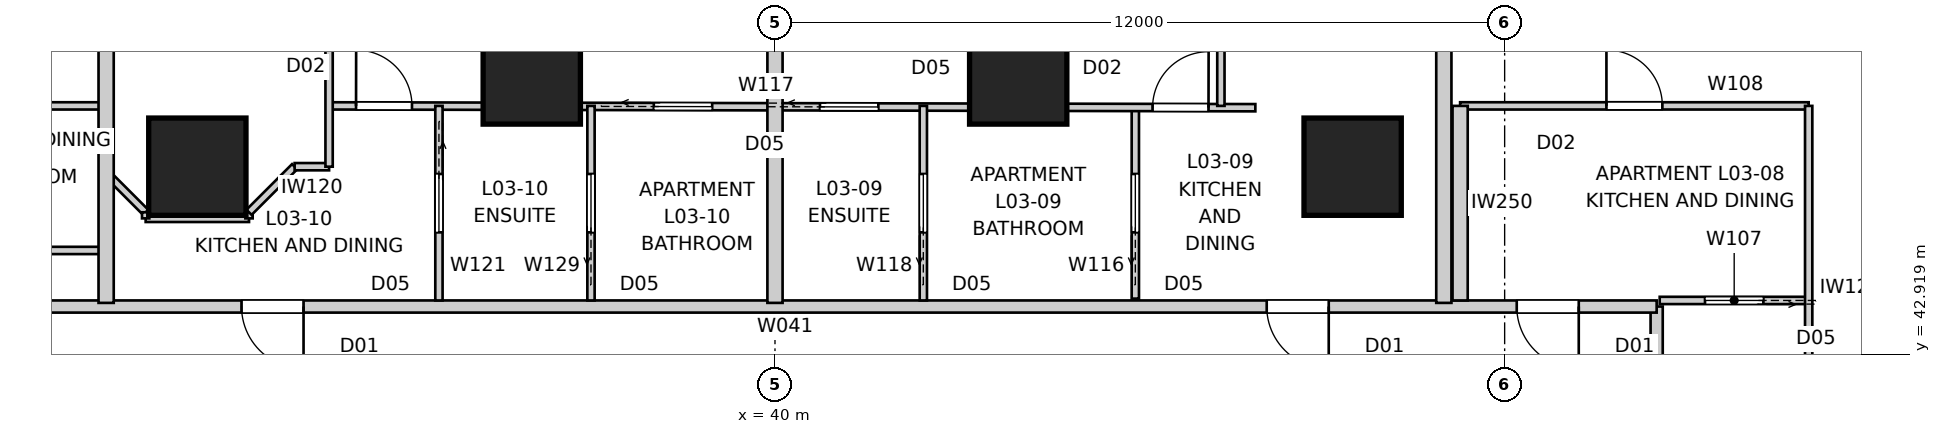
"""IFC4 building model, lengths in metres.
Left out: names, types, materials, properties, quantities, classifications, styles, units other than length and angle.
Written with IfcOpenShell. Run it as: python <this file> out.ifc"""

import sys

from ifc_helpers import new_model, si_unit, direction, frame, frame_2d, origin, origin_2d, place, context, subcontext, project, spatial, rectangle, extrude, element, fill, save


model = new_model("IFC4")
c1 = context("Model", 3, precision=1e-05, world=origin(), true_north=direction((0.0, 1.0)))
c2 = subcontext(c1, "Body", "Model", "MODEL_VIEW")
j1 = project(units=[si_unit("LENGTHUNIT", "METRE"), si_unit("PLANEANGLEUNIT", "RADIAN")], contexts=[c1])
p1 = place(None, origin())
s1 = spatial("IfcSite", under=j1, at=p1, CompositionType="ELEMENT")
p2 = place(p1, origin())
s2 = spatial("IfcBuilding", under=s1, at=p2, CompositionType="ELEMENT")
p3 = place(p2, frame((0.0, 0.0, 15.0)))
s3 = spatial("IfcBuildingStorey", under=s2, at=p3, CompositionType="ELEMENT", Elevation=15.0)
for number, where, z_axis, x_axis in (
    (1, (49.5, 46.0, 0.0), (0.0, 0.0, 1.0), (1.0, 0.0, 0.0)),
    (2, (44.0, 47.5, 0.0), (0.0, 0.0, 1.0), (1.0, 0.0, 0.0)),
    (3, (36.0, 47.5, 0.0), (0.0, 0.0, 1.0), (1.0, 0.0, 0.0)),
    (4, (30.5, 46.0, 0.0), (0.0, 0.0, 1.0), (1.0, 0.0, 0.0)),
):
    element("IfcColumn", number, at=place(p3, frame(where, z_axis=z_axis, x_axis=x_axis)), inside=s3, PredefinedType="COLUMN", context=c2, shape_type="SweptSolid", body=[
        extrude(rectangle(XDim=1.6, YDim=1.6, at=origin_2d()), origin(), (0.0, 0.0, 1.0), 3.4),
    ])
p4 = place(p3, frame((54.5, 16.3, 0.0), z_axis=(0.0, 0.0, 1.0), x_axis=(0.0, 1.0, 0.0)))
e5 = element("IfcWall", 5, at=p4, inside=s3, PredefinedType="PARTITIONING", context=c2, shape_type="SweptSolid", body=[
    extrude(rectangle(XDim=27.4, YDim=0.2, at=frame_2d((13.7, 0.0))), origin(), (0.0, 0.0, 1.0), 3.25),
])
p5 = place(p4, frame((20.998, 0.0, 0.0)))
e6 = element("IfcOpeningElement", 6, at=p5, cuts=e5, PredefinedType="OPENING", context=c2, shape_type="SweptSolid", body=[
    extrude(rectangle(XDim=1.02, YDim=2.34, at=frame_2d((0.51, 1.17))), frame((0.0, 0.11, 0.0), z_axis=(0.0, -1.0, 0.0), x_axis=(1.0, 0.0, 0.0)), (0.0, 0.0, 1.0), 0.22),
])
p6 = place(p4, frame((11.119, 0.0, 0.0)))
e7 = element("IfcOpeningElement", 7, at=p6, cuts=e5, PredefinedType="OPENING", context=c2, shape_type="SweptSolid", body=[
    extrude(rectangle(XDim=1.02, YDim=2.34, at=frame_2d((0.51, 1.17))), frame((0.0, 0.11, 0.0), z_axis=(0.0, -1.0, 0.0), x_axis=(1.0, 0.0, 0.0)), (0.0, 0.0, 1.0), 0.22),
])
p7 = place(p4, frame((1.015, 0.0, 0.0)))
e8 = element("IfcOpeningElement", 8, at=p7, cuts=e5, PredefinedType="OPENING", context=c2, shape_type="SweptSolid", body=[
    extrude(rectangle(XDim=1.02, YDim=2.34, at=frame_2d((0.51, 1.17))), frame((0.0, 0.11, 0.0), z_axis=(0.0, -1.0, 0.0), x_axis=(1.0, 0.0, 0.0)), (0.0, 0.0, 1.0), 0.22),
])
p8 = place(p3, frame((54.5, 43.7, 0.0), z_axis=(0.0, 0.0, 1.0), x_axis=(-1.0, 0.0, 0.0)))
e9 = element("IfcWall", 9, at=p8, inside=s3, PredefinedType="PARTITIONING", context=c2, shape_type="SweptSolid", body=[
    extrude(rectangle(XDim=29.0, YDim=0.2, at=frame_2d((14.5, 0.0))), origin(), (0.0, 0.0, 1.0), 3.25),
])
p9 = place(p8, frame((22.253, 0.0, 0.0)))
e10 = element("IfcOpeningElement", 10, at=p9, cuts=e9, PredefinedType="OPENING", context=c2, shape_type="SweptSolid", body=[
    extrude(rectangle(XDim=1.02, YDim=2.34, at=frame_2d((0.51, 1.17))), frame((0.0, 0.11, 0.0), z_axis=(0.0, -1.0, 0.0), x_axis=(1.0, 0.0, 0.0)), (0.0, 0.0, 1.0), 0.22),
])
p10 = place(p8, frame((5.393, 0.0, 0.0)))
e11 = element("IfcOpeningElement", 11, at=p10, cuts=e9, PredefinedType="OPENING", context=c2, shape_type="SweptSolid", body=[
    extrude(rectangle(XDim=1.02, YDim=2.34, at=frame_2d((0.51, 1.17))), frame((0.0, 0.11, 0.0), z_axis=(0.0, -1.0, 0.0), x_axis=(1.0, 0.0, 0.0)), (0.0, 0.0, 1.0), 0.22),
])
p11 = place(p8, frame((1.281, 0.0, 0.0)))
e12 = element("IfcOpeningElement", 12, at=p11, cuts=e9, PredefinedType="OPENING", context=c2, shape_type="SweptSolid", body=[
    extrude(rectangle(XDim=1.02, YDim=2.34, at=frame_2d((0.51, 1.17))), frame((0.0, 0.11, 0.0), z_axis=(0.0, -1.0, 0.0), x_axis=(1.0, 0.0, 0.0)), (0.0, 0.0, 1.0), 0.22),
])
for number, where, z_axis, x_axis in (
    (13, (51.0, 56.0, 0.0), (0.0, 0.0, 1.0), (0.0, -1.0, 0.0)),
    (14, (29.0, 56.0, 0.0), (0.0, 0.0, 1.0), (0.0, -1.0, 0.0)),
):
    element("IfcWall", number, at=place(p3, frame(where, z_axis=z_axis, x_axis=x_axis)), inside=s3, PredefinedType="PARTITIONING", context=c2, shape_type="SweptSolid", body=[
        extrude(rectangle(XDim=12.24, YDim=0.25, at=frame_2d((6.12, 0.0))), origin(), (0.0, 0.0, 1.0), 3.25),
    ])
p12 = place(p3, frame((40.0, 56.0, 0.0), z_axis=(0.0, 0.0, 1.0), x_axis=(0.0, -1.0, 0.0)))
e15 = element("IfcWall", 15, at=p12, inside=s3, PredefinedType="PARTITIONING", context=c2, shape_type="SweptSolid", body=[
    extrude(rectangle(XDim=8.5, YDim=0.25, at=frame_2d((4.25, 0.0))), origin(), (0.0, 0.0, 1.0), 3.25),
])
p13 = place(p3, frame((40.0, 47.5, 0.0), z_axis=(0.0, 0.0, 1.0), x_axis=(0.0, -1.0, 0.0)))
e16 = element("IfcWall", 16, at=p13, inside=s3, PredefinedType="PARTITIONING", context=c2, shape_type="SweptSolid", body=[
    extrude(rectangle(XDim=3.74, YDim=0.25, at=frame_2d((1.87, 0.0))), origin(), (0.0, 0.0, 1.0), 2.796),
])
p14 = place(p3, frame((57.0, 43.8, 0.0), z_axis=(0.0, 0.0, 1.0), x_axis=(-1.0, 0.0, 0.0)))
e17 = element("IfcWall", 17, at=p14, inside=s3, PredefinedType="PARTITIONING", context=c2, shape_type="SweptSolid", body=[
    extrude(rectangle(XDim=2.45, YDim=0.12, at=frame_2d((1.225, 0.0))), origin(), (0.0, 0.0, 1.0), 3.25),
])
p15 = place(p14, frame((0.745, 0.0, 0.0)))
e18 = element("IfcOpeningElement", 18, at=p15, cuts=e17, PredefinedType="OPENING", context=c2, shape_type="SweptSolid", body=[
    extrude(rectangle(XDim=0.96, YDim=2.1, at=frame_2d((0.48, 1.05))), frame((0.0, 0.07, 0.0), z_axis=(0.0, -1.0, 0.0), x_axis=(1.0, 0.0, 0.0)), (0.0, 0.0, 1.0), 0.14),
])
p16 = place(p3, frame((51.268, 47.0, 0.0), z_axis=(0.0, 0.0, 1.0), x_axis=(1.0, 0.0, 0.0)))
e19 = element("IfcWall", 19, at=p16, inside=s3, PredefinedType="PARTITIONING", context=c2, shape_type="SweptSolid", body=[
    extrude(rectangle(XDim=5.732, YDim=0.12, at=frame_2d((2.866, 0.0))), origin(), (0.0, 0.0, 1.0), 3.25),
])
p17 = place(p16, frame((2.406, 0.0, 0.0)))
e20 = element("IfcOpeningElement", 20, at=p17, cuts=e19, PredefinedType="OPENING", context=c2, shape_type="SweptSolid", body=[
    extrude(rectangle(XDim=0.92, YDim=2.34, at=frame_2d((0.46, 1.17))), frame((0.0, 0.07, 0.0), z_axis=(0.0, -1.0, 0.0), x_axis=(1.0, 0.0, 0.0)), (0.0, 0.0, 1.0), 0.14),
])
p18 = place(p3, frame((57.0, 47.0, 0.0), z_axis=(0.0, 0.0, 1.0), x_axis=(0.0, -1.0, 0.0)))
e21 = element("IfcWall", 21, at=p18, inside=s3, PredefinedType="PARTITIONING", context=c2, shape_type="SweptSolid", body=[
    extrude(rectangle(XDim=6.0, YDim=0.12, at=frame_2d((3.0, 0.0))), origin(), (0.0, 0.0, 1.0), 3.25),
])
p19 = place(p3, frame((51.268, 43.8, 0.0), z_axis=(0.0, 0.0, 1.0), x_axis=(0.0, 1.0, 0.0)))
e22 = element("IfcWall", 22, at=p19, inside=s3, PredefinedType="PARTITIONING", context=c2, shape_type="SweptSolid", body=[
    extrude(rectangle(XDim=3.2, YDim=0.25, at=frame_2d((1.6, 0.0))), origin(), (0.0, 0.0, 1.0), 3.25),
])
p20 = place(p3, frame((45.926, 43.83, 0.0), z_axis=(0.0, 0.0, 1.0), x_axis=(0.0, 1.0, 0.0)))
e23 = element("IfcWall", 23, at=p20, inside=s3, PredefinedType="PARTITIONING", context=c2, shape_type="SweptSolid", body=[
    extrude(rectangle(XDim=3.14, YDim=0.12, at=frame_2d((1.57, 0.0))), origin(), (0.0, 0.0, 1.0), 3.25),
])
p21 = place(p20, frame((1.09, 0.0, 0.0)))
e24 = element("IfcOpeningElement", 24, at=p21, cuts=e23, PredefinedType="OPENING", context=c2, shape_type="SweptSolid", body=[
    extrude(rectangle(XDim=0.96, YDim=2.1, at=frame_2d((0.48, 1.05))), frame((0.0, 0.07, 0.0), z_axis=(0.0, -1.0, 0.0), x_axis=(1.0, 0.0, 0.0)), (0.0, 0.0, 1.0), 0.14),
])
p22 = place(p3, frame((32.667, 47.0, 0.0), z_axis=(0.0, 0.0, 1.0), x_axis=(0.999998056971, -0.001971307974, 0.0)))
e25 = element("IfcWall", 25, at=p22, inside=s3, PredefinedType="PARTITIONING", context=c2, shape_type="SweptSolid", body=[
    extrude(rectangle(XDim=15.233, YDim=0.12, at=frame_2d((7.617, 0.0))), origin(), (0.0, 0.0, 1.0), 2.549),
])
p23 = place(p22, frame((0.443, 0.0, 0.0)))
e26 = element("IfcOpeningElement", 26, at=p23, cuts=e25, PredefinedType="OPENING", context=c2, shape_type="SweptSolid", body=[
    extrude(rectangle(XDim=0.92, YDim=2.34, at=frame_2d((0.46, 1.17))), frame((0.0, 0.07, 0.0), z_axis=(0.0, -1.0, 0.0), x_axis=(1.0, 0.0, 0.0)), (0.0, 0.0, 1.0), 0.14),
])
p24 = place(p22, frame((13.543, 0.0, 0.0)))
e27 = element("IfcOpeningElement", 27, at=p24, cuts=e25, PredefinedType="OPENING", context=c2, shape_type="SweptSolid", body=[
    extrude(rectangle(XDim=0.92, YDim=2.34, at=frame_2d((0.46, 1.17))), frame((0.0, 0.07, 0.0), z_axis=(0.0, -1.0, 0.0), x_axis=(1.0, 0.0, 0.0)), (0.0, 0.0, 1.0), 0.14),
])
p25 = place(p22, frame((5.34, 0.0, 0.0)))
e28 = element("IfcOpeningElement", 28, at=p25, cuts=e25, PredefinedType="OPENING", context=c2, shape_type="SweptSolid", body=[
    extrude(rectangle(XDim=0.96, YDim=2.1, at=frame_2d((0.48, 1.05))), frame((0.0, 0.07, 0.0), z_axis=(0.0, -1.0, 0.0), x_axis=(1.0, 0.0, 0.0)), (0.0, 0.0, 1.0), 0.14),
])
p26 = place(p22, frame((8.073, 0.0, 0.0)))
e29 = element("IfcOpeningElement", 29, at=p26, cuts=e25, PredefinedType="OPENING", context=c2, shape_type="SweptSolid", body=[
    extrude(rectangle(XDim=0.96, YDim=2.1, at=frame_2d((0.48, 1.05))), frame((0.0, 0.07, 0.0), z_axis=(0.0, -1.0, 0.0), x_axis=(1.0, 0.0, 0.0)), (0.0, 0.0, 1.0), 0.14),
])
p27 = place(p3, frame((42.44, 43.8, 0.0), z_axis=(0.0, 0.0, 1.0), x_axis=(0.0, 1.0, 0.0)))
e30 = element("IfcWall", 30, at=p27, inside=s3, PredefinedType="PARTITIONING", context=c2, shape_type="SweptSolid", body=[
    extrude(rectangle(XDim=3.2, YDim=0.12, at=frame_2d((1.6, 0.0))), origin(), (0.0, 0.0, 1.0), 3.25),
])
p28 = place(p27, frame((1.12, 0.0, 0.0)))
e31 = element("IfcOpeningElement", 31, at=p28, cuts=e30, PredefinedType="OPENING", context=c2, shape_type="SweptSolid", body=[
    extrude(rectangle(XDim=0.96, YDim=2.1, at=frame_2d((0.48, 1.05))), frame((0.0, 0.07, 0.0), z_axis=(0.0, -1.0, 0.0), x_axis=(1.0, 0.0, 0.0)), (0.0, 0.0, 1.0), 0.14),
])
p29 = place(p3, frame((47.333, 47.0, 0.0), z_axis=(0.0, 0.0, 1.0), x_axis=(0.0, 1.0, 0.0)))
e32 = element("IfcWall", 32, at=p29, inside=s3, PredefinedType="PARTITIONING", context=c2, shape_type="SweptSolid", body=[
    extrude(rectangle(XDim=8.96, YDim=0.12, at=frame_2d((4.48, 0.0))), origin(), (0.0, 0.0, 1.0), 3.25),
])
p30 = place(p29, frame((4.04, 0.0, 0.0)))
e33 = element("IfcOpeningElement", 33, at=p30, cuts=e32, PredefinedType="OPENING", context=c2, shape_type="SweptSolid", body=[
    extrude(rectangle(XDim=0.92, YDim=2.34, at=frame_2d((0.46, 1.17))), frame((0.0, 0.07, 0.0), z_axis=(0.0, -1.0, 0.0), x_axis=(1.0, 0.0, 0.0)), (0.0, 0.0, 1.0), 0.14),
])
p31 = place(p3, frame((43.667, 55.96, 0.0), z_axis=(0.0, 0.0, 1.0), x_axis=(0.0, -1.0, 0.0)))
e34 = element("IfcWall", 34, at=p31, inside=s3, PredefinedType="PARTITIONING", context=c2, shape_type="SweptSolid", body=[
    extrude(rectangle(XDim=8.96, YDim=0.12, at=frame_2d((4.48, 0.0))), origin(), (0.0, 0.0, 1.0), 3.25),
])
p32 = place(p3, frame((34.473, 47.0, 0.0), z_axis=(0.0, 0.0, 1.0), x_axis=(0.0, -1.0, 0.0)))
e35 = element("IfcWall", 35, at=p32, inside=s3, PredefinedType="PARTITIONING", context=c2, shape_type="SweptSolid", body=[
    extrude(rectangle(XDim=3.2, YDim=0.12, at=frame_2d((1.6, 0.0))), origin(), (0.0, 0.0, 1.0), 3.25),
])
p33 = place(p32, frame((1.12, 0.0, 0.0)))
e36 = element("IfcOpeningElement", 36, at=p33, cuts=e35, PredefinedType="OPENING", context=c2, shape_type="SweptSolid", body=[
    extrude(rectangle(XDim=0.96, YDim=2.1, at=frame_2d((0.48, 1.05))), frame((0.0, 0.07, 0.0), z_axis=(0.0, -1.0, 0.0), x_axis=(1.0, 0.0, 0.0)), (0.0, 0.0, 1.0), 0.14),
])
p34 = place(p3, frame((29.0, 45.9, 0.0), z_axis=(0.0, 0.0, 1.0), x_axis=(0.707106781187, -0.707106781187, 0.0)))
e37 = element("IfcWall", 37, at=p34, inside=s3, PredefinedType="PARTITIONING", context=c2, shape_type="SweptSolid", body=[
    extrude(rectangle(XDim=0.919, YDim=0.12, at=frame_2d((0.459, 0.0))), origin(), (0.0, 0.0, 1.0), 3.25),
])
p35 = place(p3, frame((29.65, 45.15, 0.0), z_axis=(0.0, 0.0, 1.0), x_axis=(1.0, 0.0, 0.0)))
e38 = element("IfcWall", 38, at=p35, inside=s3, PredefinedType="PARTITIONING", context=c2, shape_type="SweptSolid", body=[
    extrude(rectangle(XDim=1.7, YDim=0.12, at=frame_2d((0.85, 0.0))), origin(), (0.0, 0.0, 1.0), 3.25),
])
p36 = place(p3, frame((31.35, 45.25, 0.0), z_axis=(0.0, 0.0, 1.0), x_axis=(0.707106781187, 0.707106781187, 0.0)))
e39 = element("IfcWall", 39, at=p36, inside=s3, PredefinedType="PARTITIONING", context=c2, shape_type="SweptSolid", body=[
    extrude(rectangle(XDim=1.061, YDim=0.12, at=frame_2d((0.53, 0.0))), origin(), (0.0, 0.0, 1.0), 3.25),
])
p37 = place(p3, frame((32.1, 46.0, 0.0), z_axis=(0.0, 0.0, 1.0), x_axis=(1.0, 0.0, 0.0)))
e40 = element("IfcWall", 40, at=p37, inside=s3, PredefinedType="PARTITIONING", context=c2, shape_type="SweptSolid", body=[
    extrude(rectangle(XDim=0.567, YDim=0.12, at=frame_2d((0.283, 0.0))), origin(), (0.0, 0.0, 1.0), 3.25),
])
p38 = place(p3, frame((32.667, 46.0, 0.0), z_axis=(0.0, 0.0, 1.0), x_axis=(0.0, 1.0, 0.0)))
e41 = element("IfcWall", 41, at=p38, inside=s3, PredefinedType="PARTITIONING", context=c2, shape_type="SweptSolid", body=[
    extrude(rectangle(XDim=9.96, YDim=0.12, at=frame_2d((4.98, 0.0))), origin(), (0.0, 0.0, 1.0), 3.25),
])
p39 = place(p38, frame((5.015, 0.0, 0.0)))
e42 = element("IfcOpeningElement", 42, at=p39, cuts=e41, PredefinedType="OPENING", context=c2, shape_type="SweptSolid", body=[
    extrude(rectangle(XDim=0.92, YDim=2.34, at=frame_2d((0.46, 1.17))), frame((0.0, 0.07, 0.0), z_axis=(0.0, -1.0, 0.0), x_axis=(1.0, 0.0, 0.0)), (0.0, 0.0, 1.0), 0.14),
])
p40 = place(p3, frame((36.974, 43.8, 0.0), z_axis=(0.0, 0.0, 1.0), x_axis=(0.0, 1.0, 0.0)))
e43 = element("IfcWall", 43, at=p40, inside=s3, PredefinedType="PARTITIONING", context=c2, shape_type="SweptSolid", body=[
    extrude(rectangle(XDim=3.2, YDim=0.12, at=frame_2d((1.6, 0.0))), origin(), (0.0, 0.0, 1.0), 3.25),
])
p41 = place(p40, frame((1.12, 0.0, 0.0)))
e44 = element("IfcOpeningElement", 44, at=p41, cuts=e43, PredefinedType="OPENING", context=c2, shape_type="SweptSolid", body=[
    extrude(rectangle(XDim=0.96, YDim=2.1, at=frame_2d((0.48, 1.05))), frame((0.0, 0.07, 0.0), z_axis=(0.0, -1.0, 0.0), x_axis=(1.0, 0.0, 0.0)), (0.0, 0.0, 1.0), 0.14),
])
p42 = place(p3, frame((36.333, 47.0, 0.0), z_axis=(0.0, 0.0, 1.0), x_axis=(0.0, 1.0, 0.0)))
e45 = element("IfcWall", 45, at=p42, inside=s3, PredefinedType="PARTITIONING", context=c2, shape_type="SweptSolid", body=[
    extrude(rectangle(XDim=8.96, YDim=0.12, at=frame_2d((4.48, 0.0))), origin(), (0.0, 0.0, 1.0), 3.25),
])
p43 = place(p3, frame((23.0, 44.622, 0.0), z_axis=(0.0, 0.0, 1.0), x_axis=(1.0, 0.0, 0.0)))
e46 = element("IfcWall", 46, at=p43, inside=s3, PredefinedType="PARTITIONING", context=c2, shape_type="SweptSolid", body=[
    extrude(rectangle(XDim=6.0, YDim=0.12, at=frame_2d((3.0, 0.0))), origin(), (0.0, 0.0, 1.0), 2.637),
])
p44 = place(p43, frame((1.47, 0.0, 0.0)))
e47 = element("IfcOpeningElement", 47, at=p44, cuts=e46, PredefinedType="OPENING", context=c2, shape_type="SweptSolid", body=[
    extrude(rectangle(XDim=0.96, YDim=2.1, at=frame_2d((0.48, 1.05))), frame((0.0, 0.07, 0.0), z_axis=(0.0, -1.0, 0.0), x_axis=(1.0, 0.0, 0.0)), (0.0, 0.0, 1.0), 0.14),
])
p45 = place(p3, frame((23.0, 47.0, 0.0), z_axis=(0.0, 0.0, 1.0), x_axis=(1.0, 0.0, 0.0)))
e48 = element("IfcWall", 48, at=p45, inside=s3, PredefinedType="PARTITIONING", context=c2, shape_type="SweptSolid", body=[
    extrude(rectangle(XDim=6.0, YDim=0.12, at=frame_2d((3.0, 0.0))), origin(), (0.0, 0.0, 1.0), 3.25),
])
for number, where, z_axis, x_axis in (
    (49, (29.65, 45.15, 0.0), (0.0, 0.0, 1.0), (0.0, 1.0, 0.0)),
    (50, (31.35, 45.15, 0.0), (0.0, 0.0, 1.0), (0.0, 1.0, 0.0)),
):
    element("IfcWall", number, at=place(p3, frame(where, z_axis=z_axis, x_axis=x_axis)), inside=s3, PredefinedType="PARTITIONING", context=c2, shape_type="SweptSolid", body=[
        extrude(rectangle(XDim=0.1, YDim=0.12, at=frame_2d((0.05, 0.0))), origin(), (0.0, 0.0, 1.0), 3.25),
    ])
p46 = place(p9, origin())
e51 = element("IfcDoor", 51, at=p46, inside=s3, OperationType="SINGLE_SWING_LEFT", PredefinedType="DOOR", context=c2, shape_type="SweptSolid", body=[
    extrude(rectangle(XDim=1.02, YDim=2.34, at=frame_2d((0.51, 1.17))), frame((0.0, 0.025, 0.0), z_axis=(0.0, -1.0, 0.0), x_axis=(1.0, 0.0, 0.0)), (0.0, 0.0, 1.0), 0.05),
])
fill(e10, e51)
p47 = place(p10, origin())
e52 = element("IfcDoor", 52, at=p47, inside=s3, OperationType="SINGLE_SWING_LEFT", PredefinedType="DOOR", context=c2, shape_type="SweptSolid", body=[
    extrude(rectangle(XDim=1.02, YDim=2.34, at=frame_2d((0.51, 1.17))), frame((0.0, 0.025, 0.0), z_axis=(0.0, -1.0, 0.0), x_axis=(1.0, 0.0, 0.0)), (0.0, 0.0, 1.0), 0.05),
])
fill(e11, e52)
p48 = place(p11, origin())
e53 = element("IfcDoor", 53, at=p48, inside=s3, OperationType="SINGLE_SWING_LEFT", PredefinedType="DOOR", context=c2, shape_type="SweptSolid", body=[
    extrude(rectangle(XDim=1.02, YDim=2.34, at=frame_2d((0.51, 1.17))), frame((0.0, 0.025, 0.0), z_axis=(0.0, -1.0, 0.0), x_axis=(1.0, 0.0, 0.0)), (0.0, 0.0, 1.0), 0.05),
])
fill(e12, e53)
p49 = place(p33, origin())
e54 = element("IfcDoor", 54, at=p49, inside=s3, OperationType="SLIDING_TO_LEFT", PredefinedType="DOOR", context=c2, shape_type="SweptSolid", body=[
    extrude(rectangle(XDim=0.96, YDim=2.1, at=frame_2d((0.48, 1.05))), frame((0.0, 0.025, 0.0), z_axis=(0.0, -1.0, 0.0), x_axis=(1.0, 0.0, 0.0)), (0.0, 0.0, 1.0), 0.05),
])
fill(e36, e54)
p50 = place(p23, origin())
e55 = element("IfcDoor", 55, at=p50, inside=s3, OperationType="SINGLE_SWING_LEFT", PredefinedType="DOOR", context=c2, shape_type="SweptSolid", body=[
    extrude(rectangle(XDim=0.92, YDim=2.34, at=frame_2d((0.46, 1.17))), frame((0.0, 0.025, 0.0), z_axis=(0.0, -1.0, 0.0), x_axis=(1.0, 0.0, 0.0)), (0.0, 0.0, 1.0), 0.05),
])
fill(e26, e55)
p51 = place(p21, origin())
e56 = element("IfcDoor", 56, at=p51, inside=s3, OperationType="SLIDING_TO_LEFT", PredefinedType="DOOR", context=c2, shape_type="SweptSolid", body=[
    extrude(rectangle(XDim=0.96, YDim=2.1, at=frame_2d((0.48, 1.05))), frame((0.0, 0.025, 0.0), z_axis=(0.0, -1.0, 0.0), x_axis=(1.0, 0.0, 0.0)), (0.0, 0.0, 1.0), 0.05),
])
fill(e24, e56)
p52 = place(p24, origin())
e57 = element("IfcDoor", 57, at=p52, inside=s3, OperationType="SINGLE_SWING_RIGHT", PredefinedType="DOOR", context=c2, shape_type="SweptSolid", body=[
    extrude(rectangle(XDim=0.92, YDim=2.34, at=frame_2d((0.46, 1.17))), frame((0.0, 0.025, 0.0), z_axis=(0.0, -1.0, 0.0), x_axis=(1.0, 0.0, 0.0)), (0.0, 0.0, 1.0), 0.05),
])
fill(e27, e57)
p53 = place(p17, origin())
e58 = element("IfcDoor", 58, at=p53, inside=s3, OperationType="SINGLE_SWING_LEFT", PredefinedType="DOOR", context=c2, shape_type="SweptSolid", body=[
    extrude(rectangle(XDim=0.92, YDim=2.34, at=frame_2d((0.46, 1.17))), frame((0.0, 0.025, 0.0), z_axis=(0.0, -1.0, 0.0), x_axis=(1.0, 0.0, 0.0)), (0.0, 0.0, 1.0), 0.05),
])
fill(e20, e58)
p54 = place(p15, origin())
e59 = element("IfcDoor", 59, at=p54, inside=s3, OperationType="SLIDING_TO_LEFT", PredefinedType="DOOR", context=c2, shape_type="SweptSolid", body=[
    extrude(rectangle(XDim=0.96, YDim=2.1, at=frame_2d((0.48, 1.05))), frame((0.0, 0.025, 0.0), z_axis=(0.0, -1.0, 0.0), x_axis=(1.0, 0.0, 0.0)), (0.0, 0.0, 1.0), 0.05),
])
fill(e18, e59)
p55 = place(p41, origin())
e60 = element("IfcDoor", 60, at=p55, inside=s3, OperationType="SLIDING_TO_LEFT", PredefinedType="DOOR", context=c2, shape_type="SweptSolid", body=[
    extrude(rectangle(XDim=0.96, YDim=2.1, at=frame_2d((0.48, 1.05))), frame((0.0, 0.025, 0.0), z_axis=(0.0, -1.0, 0.0), x_axis=(1.0, 0.0, 0.0)), (0.0, 0.0, 1.0), 0.05),
])
fill(e44, e60)
p56 = place(p28, origin())
e61 = element("IfcDoor", 61, at=p56, inside=s3, OperationType="SLIDING_TO_LEFT", PredefinedType="DOOR", context=c2, shape_type="SweptSolid", body=[
    extrude(rectangle(XDim=0.96, YDim=2.1, at=frame_2d((0.48, 1.05))), frame((0.0, 0.025, 0.0), z_axis=(0.0, -1.0, 0.0), x_axis=(1.0, 0.0, 0.0)), (0.0, 0.0, 1.0), 0.05),
])
fill(e31, e61)
p57 = place(p25, origin())
e62 = element("IfcDoor", 62, at=p57, inside=s3, OperationType="SLIDING_TO_LEFT", PredefinedType="DOOR", context=c2, shape_type="SweptSolid", body=[
    extrude(rectangle(XDim=0.96, YDim=2.1, at=frame_2d((0.48, 1.05))), frame((0.0, 0.025, 0.0), z_axis=(0.0, -1.0, 0.0), x_axis=(1.0, 0.0, 0.0)), (0.0, 0.0, 1.0), 0.05),
])
fill(e28, e62)
p58 = place(p26, origin())
e63 = element("IfcDoor", 63, at=p58, inside=s3, OperationType="SLIDING_TO_LEFT", PredefinedType="DOOR", context=c2, shape_type="SweptSolid", body=[
    extrude(rectangle(XDim=0.96, YDim=2.1, at=frame_2d((0.48, 1.05))), frame((0.0, 0.025, 0.0), z_axis=(0.0, -1.0, 0.0), x_axis=(1.0, 0.0, 0.0)), (0.0, 0.0, 1.0), 0.05),
])
fill(e29, e63)
save(model, sys.argv[1])
